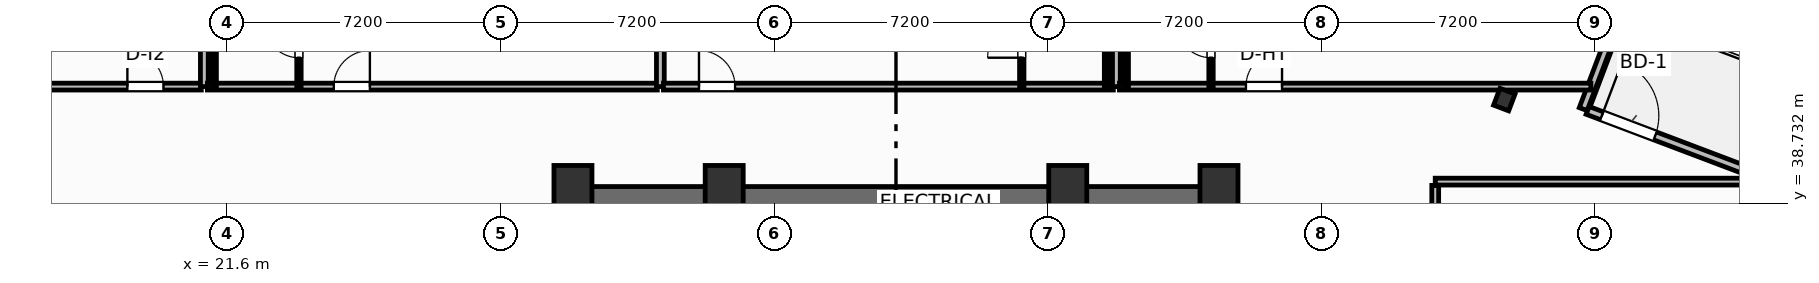
"""IFC4 building model, lengths in metres.
Left out: names, types, materials, properties, quantities, classifications, styles, units other than length and angle.
Written with IfcOpenShell. Run it as: python <this file> out.ifc"""

import sys

from ifc_helpers import new_model, si_unit, direction, frame, frame_2d, origin, origin_2d, place, context, subcontext, project, spatial, rectangle, i_section, extrude, element, fill, save


model = new_model("IFC4")
c1 = context("Model", 3, precision=1e-05, world=origin(), true_north=direction((0.0, 1.0)))
c2 = subcontext(c1, "Body", "Model", "MODEL_VIEW")
j1 = project(units=[si_unit("LENGTHUNIT", "METRE"), si_unit("PLANEANGLEUNIT", "RADIAN")], contexts=[c1])
p1 = place(None, origin())
s1 = spatial("IfcSite", under=j1, at=p1, CompositionType="ELEMENT")
p2 = place(p1, origin())
s2 = spatial("IfcBuilding", under=s1, at=p2, CompositionType="ELEMENT")
p3 = place(p2, frame((0.0, 0.0, 109.5)))
s3 = spatial("IfcBuildingStorey", under=s2, at=p3, CompositionType="ELEMENT", Elevation=109.5)
for number, where, z_axis, x_axis in (
    (1, (30.7, 39.05, 0.0), (0.0, 0.0, 1.0), (1.0, 0.0, 0.0)),
    (2, (34.68, 39.05, 0.0), (0.0, 0.0, 1.0), (1.0, 0.0, 0.0)),
    (3, (43.72, 39.05, 0.0), (0.0, 0.0, 1.0), (1.0, 0.0, 0.0)),
    (4, (47.7, 39.05, 0.0), (0.0, 0.0, 1.0), (1.0, 0.0, 0.0)),
):
    element("IfcColumn", number, at=place(p3, frame(where, z_axis=z_axis, x_axis=x_axis)), inside=s3, PredefinedType="COLUMN", context=c2, shape_type="SweptSolid", body=[
        extrude(rectangle(XDim=1.0, YDim=1.35, at=origin_2d()), origin(), (0.0, 0.0, 1.0), 3.7),
    ])
p4 = place(p3, frame((30.38, 38.795, 0.0), z_axis=(0.0, 0.0, 1.0), x_axis=(1.0, 0.0, 0.0)))
e5 = element("IfcWall", 5, at=p4, inside=s3, PredefinedType="SHEAR", context=c2, shape_type="SweptSolid", body=[
    extrude(rectangle(XDim=17.64, YDim=0.75, at=frame_2d((8.82, 0.0))), origin(), (0.0, 0.0, 1.0), 3.45),
])
p5 = place(p3, frame((55.208, 41.459, 0.0), z_axis=(0.0, 0.0, 1.0), x_axis=(0.935221751401, -0.354062530786, 0.0)))
e6 = element("IfcColumn", 6, at=p5, inside=s3, PredefinedType="COLUMN", context=c2, shape_type="SweptSolid", body=[
    extrude(i_section(OverallWidth=0.424, OverallDepth=0.474, WebThickness=0.048, FlangeThickness=0.077, FilletRadius=0.025, at=origin_2d()), origin(), (0.0, 0.0, 1.0), 3.7),
])
p6 = place(p3, frame((57.399, 41.175, 0.0), z_axis=(0.0, 0.0, 1.0), x_axis=(0.935227640088, -0.354046976001, 0.0)))
e7 = element("IfcWall", 7, at=p6, inside=s3, PredefinedType="SOLIDWALL", context=c2, shape_type="SweptSolid", body=[
    extrude(rectangle(XDim=6.0, YDim=0.22, at=frame_2d((3.0, 0.0))), origin(), (0.0, 0.0, 1.0), 2.73),
])
p7 = place(p6, frame((0.4, 0.0, 0.0)))
e8 = element("IfcOpeningElement", 8, at=p7, cuts=e7, PredefinedType="OPENING", context=c2, shape_type="SweptSolid", body=[
    extrude(rectangle(XDim=1.5, YDim=2.25, at=frame_2d((0.75, 1.125))), frame((0.0, 0.12, 0.0), z_axis=(0.0, -1.0, 0.0), x_axis=(1.0, 0.0, 0.0)), (0.0, 0.0, 1.0), 0.24),
])
p8 = place(p3, frame((57.284, 41.208, 0.0), z_axis=(0.0, 0.0, 1.0), x_axis=(0.354128469405, 0.935196785258, 0.0)))
e9 = element("IfcWall", 9, at=p8, inside=s3, PredefinedType="SOLIDWALL", context=c2, shape_type="SweptSolid", body=[
    extrude(rectangle(XDim=2.1, YDim=0.22, at=frame_2d((1.05, 0.0))), origin(), (0.0, 0.0, 1.0), 2.73),
])
p9 = place(p3, frame((5.646, 41.8, 0.0), z_axis=(0.0, 0.0, 1.0), x_axis=(1.0, 0.0, 0.0)))
e10 = element("IfcWall", 10, at=p9, inside=s3, PredefinedType="PARTITIONING", context=c2, shape_type="SweptSolid", body=[
    extrude(rectangle(XDim=15.274, YDim=0.18, at=frame_2d((7.637, 0.0))), origin(), (0.0, 0.0, 1.0), 3.45),
])
p10 = place(p9, frame((13.329, 0.0, 0.0)))
e11 = element("IfcOpeningElement", 11, at=p10, cuts=e10, PredefinedType="OPENING", context=c2, shape_type="SweptSolid", body=[
    extrude(rectangle(XDim=0.95, YDim=2.05, at=frame_2d((0.475, 1.025))), frame((0.0, 0.1, 0.0), z_axis=(0.0, -1.0, 0.0), x_axis=(1.0, 0.0, 0.0)), (0.0, 0.0, 1.0), 0.2),
])
p11 = place(p3, frame((21.0, 41.8, 0.0), z_axis=(0.0, 0.0, 1.0), x_axis=(0.0, 1.0, 0.0)))
e12 = element("IfcWall", 12, at=p11, inside=s3, PredefinedType="PARTITIONING", context=c2, shape_type="SweptSolid", body=[
    extrude(rectangle(XDim=15.285, YDim=0.205, at=frame_2d((7.642, 0.0))), origin(), (0.0, 0.0, 1.0), 3.45),
])
p12 = place(p3, frame((21.08, 41.8, 0.0), z_axis=(0.0, 0.0, 1.0), x_axis=(1.0, 0.0, 0.0)))
e13 = element("IfcWall", 13, at=p12, inside=s3, PredefinedType="PARTITIONING", context=c2, shape_type="SweptSolid", body=[
    extrude(rectangle(XDim=11.84, YDim=0.18, at=frame_2d((5.92, 0.0))), origin(), (0.0, 0.0, 1.0), 3.45),
])
p13 = place(p12, frame((3.326, 0.0, 0.0)))
e14 = element("IfcOpeningElement", 14, at=p13, cuts=e13, PredefinedType="OPENING", context=c2, shape_type="SweptSolid", body=[
    extrude(rectangle(XDim=0.95, YDim=2.15, at=frame_2d((0.475, 1.075))), frame((0.0, 0.1, 0.0), z_axis=(0.0, -1.0, 0.0), x_axis=(1.0, 0.0, 0.0)), (0.0, 0.0, 1.0), 0.2),
])
p14 = place(p3, frame((23.49, 41.8, 0.0), z_axis=(0.0, 0.0, 1.0), x_axis=(0.0, 1.0, 0.0)))
e15 = element("IfcWall", 15, at=p14, inside=s3, PredefinedType="PARTITIONING", context=c2, shape_type="SweptSolid", body=[
    extrude(rectangle(XDim=2.52, YDim=0.115, at=frame_2d((1.26, 0.0))), origin(), (0.0, 0.0, 1.0), 3.45),
])
p15 = place(p14, frame((0.76, 0.0, 0.0)))
e16 = element("IfcOpeningElement", 16, at=p15, cuts=e15, PredefinedType="OPENING", context=c2, shape_type="SweptSolid", body=[
    extrude(rectangle(XDim=0.9, YDim=2.05, at=frame_2d((0.45, 1.025))), frame((0.0, 0.067, 0.0), z_axis=(0.0, -1.0, 0.0), x_axis=(1.0, 0.0, 0.0)), (0.0, 0.0, 1.0), 0.135),
])
p16 = place(p3, frame((21.26, 41.8, 0.0), z_axis=(0.0, 0.0, 1.0), x_axis=(0.0, 1.0, 0.0)))
e17 = element("IfcWall", 17, at=p16, inside=s3, PredefinedType="PARTITIONING", context=c2, shape_type="SweptSolid", body=[
    extrude(rectangle(XDim=2.52, YDim=0.115, at=frame_2d((1.26, 0.0))), origin(), (0.0, 0.0, 1.0), 3.45),
])
p17 = place(p3, frame((33.0, 41.8, 0.0), z_axis=(0.0, 0.0, 1.0), x_axis=(0.0, 1.0, 0.0)))
e18 = element("IfcWall", 18, at=p17, inside=s3, PredefinedType="PARTITIONING", context=c2, shape_type="SweptSolid", body=[
    extrude(rectangle(XDim=8.58, YDim=0.205, at=frame_2d((4.29, 0.0))), origin(), (0.0, 0.0, 1.0), 3.45),
])
p18 = place(p3, frame((33.08, 41.8, 0.0), z_axis=(0.0, 0.0, 1.0), x_axis=(1.0, 0.0, 0.0)))
e19 = element("IfcWall", 19, at=p18, inside=s3, PredefinedType="PARTITIONING", context=c2, shape_type="SweptSolid", body=[
    extrude(rectangle(XDim=11.84, YDim=0.18, at=frame_2d((5.92, 0.0))), origin(), (0.0, 0.0, 1.0), 3.45),
])
p19 = place(p18, frame((0.936, 0.0, 0.0)))
e20 = element("IfcOpeningElement", 20, at=p19, cuts=e19, PredefinedType="OPENING", context=c2, shape_type="SweptSolid", body=[
    extrude(rectangle(XDim=0.95, YDim=2.15, at=frame_2d((0.475, 1.075))), frame((0.0, 0.1, 0.0), z_axis=(0.0, -1.0, 0.0), x_axis=(1.0, 0.0, 0.0)), (0.0, 0.0, 1.0), 0.2),
])
p20 = place(p3, frame((42.51, 41.8, 0.0), z_axis=(0.0, 0.0, 1.0), x_axis=(0.0, 1.0, 0.0)))
e21 = element("IfcWall", 21, at=p20, inside=s3, PredefinedType="PARTITIONING", context=c2, shape_type="SweptSolid", body=[
    extrude(rectangle(XDim=2.52, YDim=0.115, at=frame_2d((1.26, 0.0))), origin(), (0.0, 0.0, 1.0), 3.45),
])
p21 = place(p20, frame((0.76, 0.0, 0.0)))
e22 = element("IfcOpeningElement", 22, at=p21, cuts=e21, PredefinedType="OPENING", context=c2, shape_type="SweptSolid", body=[
    extrude(rectangle(XDim=0.9, YDim=2.05, at=frame_2d((0.45, 1.025))), frame((0.0, 0.067, 0.0), z_axis=(0.0, -1.0, 0.0), x_axis=(1.0, 0.0, 0.0)), (0.0, 0.0, 1.0), 0.135),
])
p22 = place(p3, frame((44.74, 41.8, 0.0), z_axis=(0.0, 0.0, 1.0), x_axis=(0.0, 1.0, 0.0)))
e23 = element("IfcWall", 23, at=p22, inside=s3, PredefinedType="PARTITIONING", context=c2, shape_type="SweptSolid", body=[
    extrude(rectangle(XDim=2.52, YDim=0.115, at=frame_2d((1.26, 0.0))), origin(), (0.0, 0.0, 1.0), 3.45),
])
p23 = place(p3, frame((45.0, 41.8, 0.0), z_axis=(0.0, 0.0, 1.0), x_axis=(0.0, 1.0, 0.0)))
e24 = element("IfcWall", 24, at=p23, inside=s3, PredefinedType="PARTITIONING", context=c2, shape_type="SweptSolid", body=[
    extrude(rectangle(XDim=4.037, YDim=0.205, at=frame_2d((2.019, 0.0))), origin(), (0.0, 0.0, 1.0), 3.45),
])
p24 = place(p3, frame((45.08, 41.8, 0.0), z_axis=(0.0, 0.0, 1.0), x_axis=(1.0, 0.0, 0.0)))
e25 = element("IfcWall", 25, at=p24, inside=s3, PredefinedType="PARTITIONING", context=c2, shape_type="SweptSolid", body=[
    extrude(rectangle(XDim=12.406, YDim=0.18, at=frame_2d((6.203, 0.0))), origin(), (0.0, 0.0, 1.0), 3.45),
])
p25 = place(p24, frame((3.329, 0.0, 0.0)))
e26 = element("IfcOpeningElement", 26, at=p25, cuts=e25, PredefinedType="OPENING", context=c2, shape_type="SweptSolid", body=[
    extrude(rectangle(XDim=0.95, YDim=2.15, at=frame_2d((0.475, 1.075))), frame((0.0, 0.1, 0.0), z_axis=(0.0, -1.0, 0.0), x_axis=(1.0, 0.0, 0.0)), (0.0, 0.0, 1.0), 0.2),
])
p26 = place(p3, frame((47.49, 41.8, 0.0), z_axis=(0.0, 0.0, 1.0), x_axis=(0.0, 1.0, 0.0)))
e27 = element("IfcWall", 27, at=p26, inside=s3, PredefinedType="PARTITIONING", context=c2, shape_type="SweptSolid", body=[
    extrude(rectangle(XDim=2.52, YDim=0.115, at=frame_2d((1.26, 0.0))), origin(), (0.0, 0.0, 1.0), 3.45),
])
p27 = place(p26, frame((0.76, 0.0, 0.0)))
e28 = element("IfcOpeningElement", 28, at=p27, cuts=e27, PredefinedType="OPENING", context=c2, shape_type="SweptSolid", body=[
    extrude(rectangle(XDim=0.9, YDim=2.05, at=frame_2d((0.45, 1.025))), frame((0.0, 0.067, 0.0), z_axis=(0.0, -1.0, 0.0), x_axis=(1.0, 0.0, 0.0)), (0.0, 0.0, 1.0), 0.135),
])
p28 = place(p3, frame((45.26, 41.8, 0.0), z_axis=(0.0, 0.0, 1.0), x_axis=(0.0, 1.0, 0.0)))
e29 = element("IfcWall", 29, at=p28, inside=s3, PredefinedType="PARTITIONING", context=c2, shape_type="SweptSolid", body=[
    extrude(rectangle(XDim=2.52, YDim=0.115, at=frame_2d((1.26, 0.0))), origin(), (0.0, 0.0, 1.0), 3.45),
])
p29 = place(p3, frame((53.39, 27.53, 0.0), z_axis=(0.0, 0.0, 1.0), x_axis=(0.0, 1.0, 0.0)))
e30 = element("IfcWall", 30, at=p29, inside=s3, PredefinedType="PARTITIONING", context=c2, shape_type="SweptSolid", body=[
    extrude(rectangle(XDim=11.67, YDim=0.18, at=frame_2d((5.835, 0.0))), origin(), (0.0, 0.0, 1.0), 3.45),
])
p30 = place(p29, frame((5.8, 0.0, 0.0)))
e31 = element("IfcOpeningElement", 31, at=p30, cuts=e30, PredefinedType="OPENING", context=c2, shape_type="SweptSolid", body=[
    extrude(rectangle(XDim=0.92, YDim=2.05, at=frame_2d((0.46, 1.025))), frame((0.0, 0.1, 0.0), z_axis=(0.0, -1.0, 0.0), x_axis=(1.0, 0.0, 0.0)), (0.0, 0.0, 1.0), 0.2),
])
p31 = place(p3, frame((53.39, 39.3, 0.0), z_axis=(0.0, 0.0, 1.0), x_axis=(1.0, 0.0, 0.0)))
e32 = element("IfcWall", 32, at=p31, inside=s3, PredefinedType="PARTITIONING", context=c2, shape_type="SweptSolid", body=[
    extrude(rectangle(XDim=8.876, YDim=0.18, at=frame_2d((4.438, 0.0))), origin(), (0.0, 0.0, 1.0), 3.45),
])
p32 = place(p7, origin())
e33 = element("IfcDoor", 33, at=p32, inside=s3, OperationType="SINGLE_SWING_LEFT", PredefinedType="DOOR", context=c2, shape_type="SweptSolid", body=[
    extrude(rectangle(XDim=1.5, YDim=2.25, at=frame_2d((0.75, 1.125))), frame((0.0, 0.025, 0.0), z_axis=(0.0, -1.0, 0.0), x_axis=(1.0, 0.0, 0.0)), (0.0, 0.0, 1.0), 0.05),
])
fill(e8, e33)
p33 = place(p10, origin())
e34 = element("IfcDoor", 34, at=p33, inside=s3, OperationType="SINGLE_SWING_LEFT", PredefinedType="DOOR", context=c2, shape_type="SweptSolid", body=[
    extrude(rectangle(XDim=0.95, YDim=2.05, at=frame_2d((0.475, 1.025))), frame((0.0, 0.025, 0.0), z_axis=(0.0, -1.0, 0.0), x_axis=(1.0, 0.0, 0.0)), (0.0, 0.0, 1.0), 0.05),
])
fill(e11, e34)
p34 = place(p13, origin())
e35 = element("IfcDoor", 35, at=p34, inside=s3, OperationType="SINGLE_SWING_RIGHT", PredefinedType="DOOR", context=c2, shape_type="SweptSolid", body=[
    extrude(rectangle(XDim=0.95, YDim=2.15, at=frame_2d((0.475, 1.075))), frame((0.0, 0.025, 0.0), z_axis=(0.0, -1.0, 0.0), x_axis=(1.0, 0.0, 0.0)), (0.0, 0.0, 1.0), 0.05),
])
fill(e14, e35)
p35 = place(p15, origin())
e36 = element("IfcDoor", 36, at=p35, inside=s3, OperationType="SINGLE_SWING_RIGHT", PredefinedType="DOOR", context=c2, shape_type="SweptSolid", body=[
    extrude(rectangle(XDim=0.9, YDim=2.05, at=frame_2d((0.45, 1.025))), frame((0.0, 0.025, 0.0), z_axis=(0.0, -1.0, 0.0), x_axis=(1.0, 0.0, 0.0)), (0.0, 0.0, 1.0), 0.05),
])
fill(e16, e36)
p36 = place(p19, origin())
e37 = element("IfcDoor", 37, at=p36, inside=s3, OperationType="SINGLE_SWING_LEFT", PredefinedType="DOOR", context=c2, shape_type="SweptSolid", body=[
    extrude(rectangle(XDim=0.95, YDim=2.15, at=frame_2d((0.475, 1.075))), frame((0.0, 0.025, 0.0), z_axis=(0.0, -1.0, 0.0), x_axis=(1.0, 0.0, 0.0)), (0.0, 0.0, 1.0), 0.05),
])
fill(e20, e37)
p37 = place(p21, origin())
e38 = element("IfcDoor", 38, at=p37, inside=s3, OperationType="SINGLE_SWING_LEFT", PredefinedType="DOOR", context=c2, shape_type="SweptSolid", body=[
    extrude(rectangle(XDim=0.9, YDim=2.05, at=frame_2d((0.45, 1.025))), frame((0.0, 0.025, 0.0), z_axis=(0.0, -1.0, 0.0), x_axis=(1.0, 0.0, 0.0)), (0.0, 0.0, 1.0), 0.05),
])
fill(e22, e38)
p38 = place(p25, origin())
e39 = element("IfcDoor", 39, at=p38, inside=s3, OperationType="SINGLE_SWING_RIGHT", PredefinedType="DOOR", context=c2, shape_type="SweptSolid", body=[
    extrude(rectangle(XDim=0.95, YDim=2.15, at=frame_2d((0.475, 1.075))), frame((0.0, 0.025, 0.0), z_axis=(0.0, -1.0, 0.0), x_axis=(1.0, 0.0, 0.0)), (0.0, 0.0, 1.0), 0.05),
])
fill(e26, e39)
p39 = place(p27, origin())
e40 = element("IfcDoor", 40, at=p39, inside=s3, OperationType="SINGLE_SWING_RIGHT", PredefinedType="DOOR", context=c2, shape_type="SweptSolid", body=[
    extrude(rectangle(XDim=0.9, YDim=2.05, at=frame_2d((0.45, 1.025))), frame((0.0, 0.025, 0.0), z_axis=(0.0, -1.0, 0.0), x_axis=(1.0, 0.0, 0.0)), (0.0, 0.0, 1.0), 0.05),
])
fill(e28, e40)
save(model, sys.argv[1])
